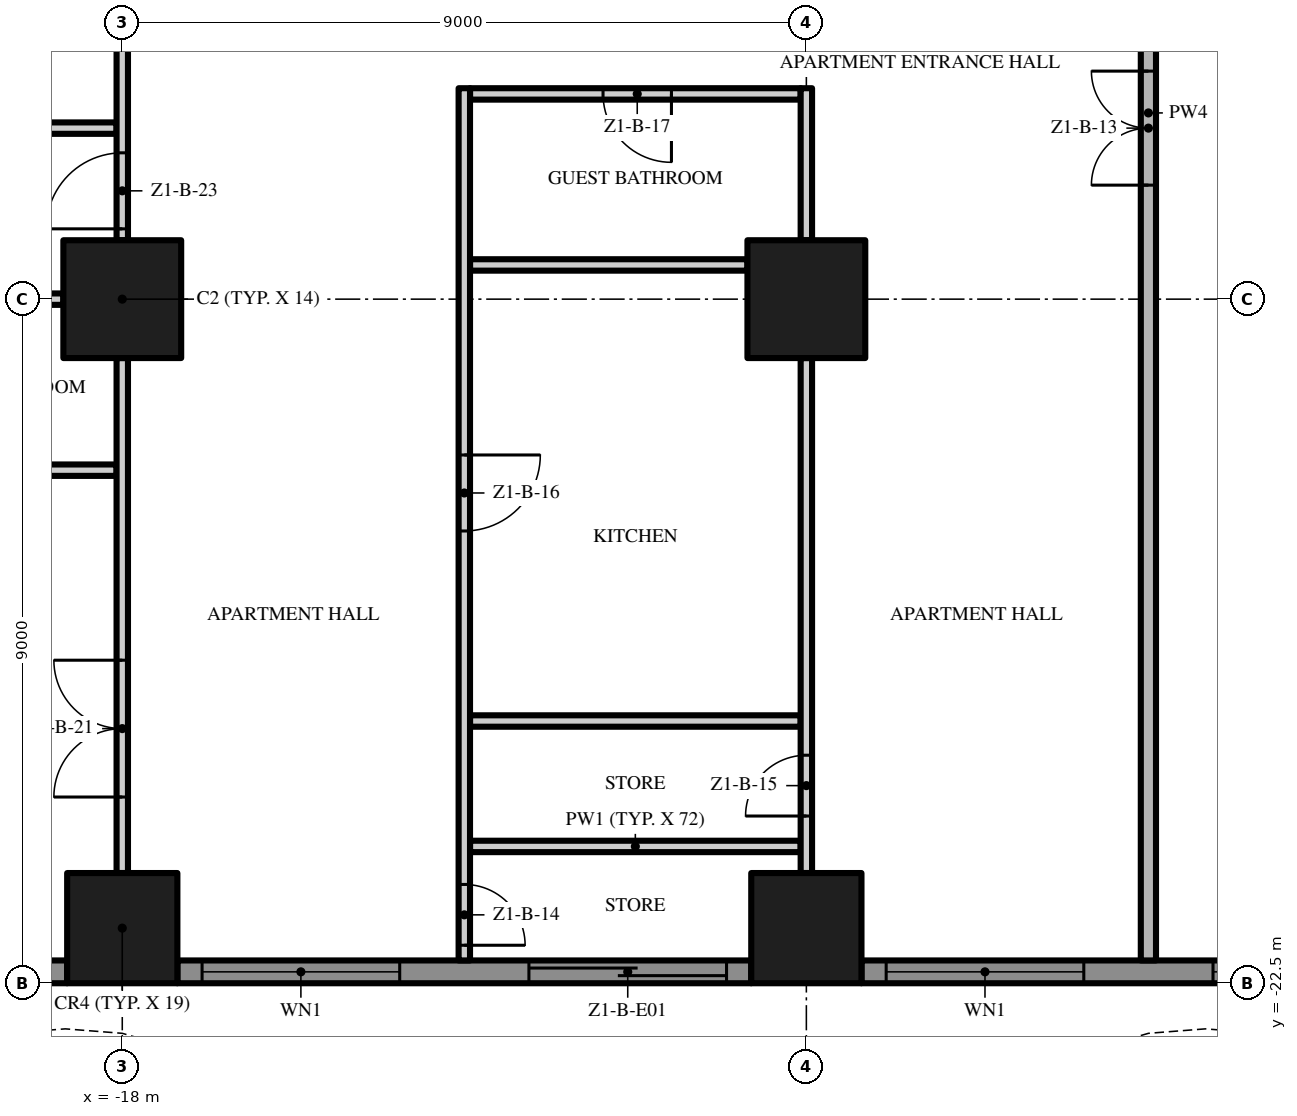
"""IFC4 building model, lengths in metres.
Left out: names, types, materials, properties, quantities, classifications, styles, units other than length and angle.
Written with IfcOpenShell. Run it as: python <this file> out.ifc"""

import sys

from ifc_helpers import new_model, si_unit, direction, frame, frame_2d, origin, origin_2d, place, context, subcontext, project, spatial, polyline, rectangle, outline, extrude, element, fill, save


model = new_model("IFC4")
c1 = context("Model", 3, precision=1e-05, world=origin(), true_north=direction((0.0, 1.0)))
c2 = subcontext(c1, "Body", "Model", "MODEL_VIEW")
j1 = project(units=[si_unit("LENGTHUNIT", "METRE"), si_unit("PLANEANGLEUNIT", "RADIAN")], contexts=[c1])
p1 = place(None, origin())
s1 = spatial("IfcSite", under=j1, at=p1, CompositionType="ELEMENT")
p2 = place(p1, origin())
s2 = spatial("IfcBuilding", under=s1, at=p2, CompositionType="ELEMENT")
p3 = place(p2, frame((0.0, 0.0, 30.2)))
s3 = spatial("IfcBuildingStorey", under=s2, at=p3, CompositionType="ELEMENT", Elevation=30.2)
p4 = place(p3, frame((-18.0, -13.5, 0.0), z_axis=(0.0, 0.0, 1.0), x_axis=(1.0, 0.0, 0.0)))
e1 = element("IfcColumn", 1, at=p4, inside=s3, PredefinedType="COLUMN", context=c2, shape_type="SweptSolid", body=[
    extrude(rectangle(XDim=1.55, YDim=1.55, at=origin_2d()), origin(), (0.0, 0.0, 1.0), 3.5),
])
p5 = place(p3, frame((-18.0, -21.775, 0.0), z_axis=(0.0, 0.0, 1.0), x_axis=(1.0, 0.0, 0.0)))
e2 = element("IfcColumn", 2, at=p5, inside=s3, PredefinedType="COLUMN", context=c2, shape_type="SweptSolid", body=[
    extrude(rectangle(XDim=1.45, YDim=1.45, at=origin_2d()), origin(), (0.0, 0.0, 1.0), 3.5),
])
p6 = place(p3, frame((-9.0, -13.5, 0.0), z_axis=(0.0, 0.0, 1.0), x_axis=(1.0, 0.0, 0.0)))
e3 = element("IfcColumn", 3, at=p6, inside=s3, PredefinedType="COLUMN", context=c2, shape_type="SweptSolid", body=[
    extrude(rectangle(XDim=1.55, YDim=1.55, at=origin_2d()), origin(), (0.0, 0.0, 1.0), 3.5),
])
p7 = place(p3, frame((-9.0, -21.775, 0.0), z_axis=(0.0, 0.0, 1.0), x_axis=(1.0, 0.0, 0.0)))
e4 = element("IfcColumn", 4, at=p7, inside=s3, PredefinedType="COLUMN", context=c2, shape_type="SweptSolid", body=[
    extrude(rectangle(XDim=1.45, YDim=1.45, at=origin_2d()), origin(), (0.0, 0.0, 1.0), 3.5),
])
p8 = place(p3, frame((-18.725, -22.35, 0.0), z_axis=(0.0, 0.0, 1.0), x_axis=(-1.0, 0.0, 0.0)))
e5 = element("IfcWall", 5, at=p8, inside=s3, PredefinedType="SOLIDWALL", context=c2, shape_type="SweptSolid", body=[
    extrude(rectangle(XDim=3.475, YDim=0.3, at=frame_2d((1.738, 0.0))), origin(), (0.0, 0.0, 1.0), 3.5),
])
p9 = place(p8, frame((0.325, 0.0, 0.45)))
e6 = element("IfcOpeningElement", 6, at=p9, cuts=e5, PredefinedType="OPENING", context=c2, shape_type="SweptSolid", body=[
    extrude(rectangle(XDim=2.6, YDim=2.65, at=frame_2d((1.3, 1.325))), frame((0.0, 0.16, 0.0), z_axis=(0.0, -1.0, 0.0), x_axis=(1.0, 0.0, 0.0)), (0.0, 0.0, 1.0), 0.32),
])
p10 = place(p3, frame((-9.725, -22.35, 0.0), z_axis=(0.0, 0.0, 1.0), x_axis=(-1.0, 0.0, 0.0)))
e7 = element("IfcWall", 7, at=p10, inside=s3, PredefinedType="SOLIDWALL", context=c2, shape_type="SweptSolid", body=[
    extrude(rectangle(XDim=7.55, YDim=0.3, at=frame_2d((3.775, 0.0))), origin(), (0.0, 0.0, 1.0), 3.5),
])
p11 = place(p10, frame((4.625, 0.0, 0.45)))
e8 = element("IfcOpeningElement", 8, at=p11, cuts=e7, PredefinedType="OPENING", context=c2, shape_type="SweptSolid", body=[
    extrude(rectangle(XDim=2.6, YDim=2.65, at=frame_2d((1.3, 1.325))), frame((0.0, 0.16, 0.0), z_axis=(0.0, -1.0, 0.0), x_axis=(1.0, 0.0, 0.0)), (0.0, 0.0, 1.0), 0.32),
])
p12 = place(p10, frame((0.325, 0.0, 0.0)))
e9 = element("IfcOpeningElement", 9, at=p12, cuts=e7, PredefinedType="OPENING", context=c2, shape_type="SweptSolid", body=[
    extrude(rectangle(XDim=2.6, YDim=2.4, at=frame_2d((1.3, 1.2))), frame((0.0, 0.16, 0.0), z_axis=(0.0, -1.0, 0.0), x_axis=(1.0, 0.0, 0.0)), (0.0, 0.0, 1.0), 0.32),
])
p13 = place(p3, frame((-0.725, -22.35, 0.0), z_axis=(0.0, 0.0, 1.0), x_axis=(-1.0, 0.0, 0.0)))
e10 = element("IfcWall", 10, at=p13, inside=s3, PredefinedType="SOLIDWALL", context=c2, shape_type="SweptSolid", body=[
    extrude(rectangle(XDim=7.55, YDim=0.3, at=frame_2d((3.775, 0.0))), origin(), (0.0, 0.0, 1.0), 3.5),
])
p14 = place(p13, frame((4.625, 0.0, 0.45)))
e11 = element("IfcOpeningElement", 11, at=p14, cuts=e10, PredefinedType="OPENING", context=c2, shape_type="SweptSolid", body=[
    extrude(rectangle(XDim=2.6, YDim=2.65, at=frame_2d((1.3, 1.325))), frame((0.0, 0.16, 0.0), z_axis=(0.0, -1.0, 0.0), x_axis=(1.0, 0.0, 0.0)), (0.0, 0.0, 1.0), 0.32),
])
p15 = place(p13, frame((0.325, 0.0, 0.45)))
e12 = element("IfcOpeningElement", 12, at=p15, cuts=e10, PredefinedType="OPENING", context=c2, shape_type="SweptSolid", body=[
    extrude(rectangle(XDim=2.6, YDim=2.65, at=frame_2d((1.3, 1.325))), frame((0.0, 0.16, 0.0), z_axis=(0.0, -1.0, 0.0), x_axis=(1.0, 0.0, 0.0)), (0.0, 0.0, 1.0), 0.32),
])
p16 = place(p3, origin())
e13 = element("IfcWall", 13, at=p16, inside=s3, PredefinedType="USERDEFINED", context=c2, shape_type="SweptSolid", body=[
    extrude(outline(polyline([(-22.5, -24.3), (-21.0, -23.595), (-19.5, -23.159), (-18.75, -23.1), (-18.0, -23.159), (-16.5, -23.595), (-15.0, -24.3), (-13.5, -25.005), (-12.0, -25.441), (-11.25, -25.5), (-10.5, -25.441), (-9.0, -25.005), (-7.5, -24.3), (-6.0, -23.595), (-4.5, -23.159), (-3.75, -23.1), (-3.0, -23.159), (-1.5, -23.595), (0.0, -24.3), (1.5, -25.005), (3.0, -25.441), (3.75, -25.5), (4.5, -25.441), (6.0, -25.005), (7.5, -24.3), (9.0, -23.595), (10.5, -23.159), (11.25, -23.1), (12.0, -23.159), (13.5, -23.595), (15.0, -24.3), (16.5, -25.005), (18.0, -25.441), (18.75, -25.5), (19.5, -25.441), (21.0, -25.005), (22.5, -24.3), (22.394, -24.074), (20.911, -24.771), (19.455, -25.194), (18.75, -25.249), (18.045, -25.194), (16.589, -24.771), (15.106, -24.074), (13.589, -23.36), (12.045, -22.911), (11.25, -22.849), (10.455, -22.911), (8.911, -23.36), (7.394, -24.074), (5.911, -24.771), (4.455, -25.194), (3.75, -25.249), (3.045, -25.194), (1.589, -24.771), (0.106, -24.074), (-1.411, -23.36), (-2.955, -22.911), (-3.75, -22.849), (-4.545, -22.911), (-6.089, -23.36), (-7.606, -24.074), (-9.089, -24.771), (-10.545, -25.194), (-11.25, -25.249), (-11.955, -25.194), (-13.411, -24.771), (-14.894, -24.074), (-16.411, -23.36), (-17.955, -22.911), (-18.75, -22.849), (-19.545, -22.911), (-21.089, -23.36), (-22.606, -24.074), (-22.5, -24.3)])), origin(), (0.0, 0.0, 1.0), 0.9),
])
for number, where, z_axis, x_axis in (
    (14, (-13.425, -20.7, 0.0), (0.0, 0.0, 1.0), (1.0, 0.0, 0.0)),
    (15, (-13.425, -19.05, 0.0), (0.0, 0.0, 1.0), (1.0, 0.0, 0.0)),
):
    element("IfcWall", number, at=place(p3, frame(where, z_axis=z_axis, x_axis=x_axis)), inside=s3, PredefinedType="PARTITIONING", context=c2, shape_type="SweptSolid", body=[
        extrude(rectangle(XDim=4.35, YDim=0.15, at=frame_2d((2.175, 0.0))), origin(), (0.0, 0.0, 1.0), 3.5),
    ])
p17 = place(p3, frame((-20.925, -15.75, 0.0), z_axis=(0.0, 0.0, 1.0), x_axis=(1.0, 0.0, 0.0)))
e16 = element("IfcWall", 16, at=p17, inside=s3, PredefinedType="PARTITIONING", context=c2, shape_type="SweptSolid", body=[
    extrude(rectangle(XDim=2.85, YDim=0.15, at=frame_2d((1.425, 0.0))), origin(), (0.0, 0.0, 1.0), 3.5),
])
p18 = place(p3, frame((-25.55, -13.5, 0.0), z_axis=(0.0, 0.0, 1.0), x_axis=(1.0, 0.0, 0.0)))
e17 = element("IfcWall", 17, at=p18, inside=s3, PredefinedType="PARTITIONING", context=c2, shape_type="SweptSolid", body=[
    extrude(rectangle(XDim=6.775, YDim=0.15, at=frame_2d((3.388, 0.0))), origin(), (0.0, 0.0, 1.0), 3.5),
])
p19 = place(p3, frame((-13.425, -13.05, 0.0), z_axis=(0.0, 0.0, 1.0), x_axis=(1.0, 0.0, 0.0)))
e18 = element("IfcWall", 18, at=p19, inside=s3, PredefinedType="PARTITIONING", context=c2, shape_type="SweptSolid", body=[
    extrude(rectangle(XDim=3.65, YDim=0.15, at=frame_2d((1.825, 0.0))), origin(), (0.0, 0.0, 1.0), 3.5),
])
p20 = place(p3, frame((-20.925, -11.25, 0.0), z_axis=(0.0, 0.0, 1.0), x_axis=(1.0, 0.0, 0.0)))
e19 = element("IfcWall", 19, at=p20, inside=s3, PredefinedType="PARTITIONING", context=c2, shape_type="SweptSolid", body=[
    extrude(rectangle(XDim=2.85, YDim=0.15, at=frame_2d((1.425, 0.0))), origin(), (0.0, 0.0, 1.0), 3.5),
])
p21 = place(p3, frame((-9.075, -10.8, 0.0), z_axis=(0.0, 0.0, 1.0), x_axis=(-1.0, 0.0, 0.0)))
e20 = element("IfcWall", 20, at=p21, inside=s3, PredefinedType="PARTITIONING", context=c2, shape_type="SweptSolid", body=[
    extrude(rectangle(XDim=4.35, YDim=0.15, at=frame_2d((2.175, 0.0))), origin(), (0.0, 0.0, 1.0), 3.5),
])
p22 = place(p21, frame((1.7, 0.0, 0.0)))
e21 = element("IfcOpeningElement", 21, at=p22, cuts=e20, PredefinedType="OPENING", context=c2, shape_type="SweptSolid", body=[
    extrude(rectangle(XDim=0.9, YDim=2.1, at=frame_2d((0.45, 1.05))), frame((0.0, 0.085, 0.0), z_axis=(0.0, -1.0, 0.0), x_axis=(1.0, 0.0, 0.0)), (0.0, 0.0, 1.0), 0.17),
])
p23 = place(p3, frame((-18.0, -21.05, 0.0), z_axis=(0.0, 0.0, 1.0), x_axis=(0.0, 1.0, 0.0)))
e22 = element("IfcWall", 22, at=p23, inside=s3, PredefinedType="PARTITIONING", context=c2, shape_type="SweptSolid", body=[
    extrude(rectangle(XDim=6.775, YDim=0.15, at=frame_2d((3.388, 0.0))), origin(), (0.0, 0.0, 1.0), 3.5),
])
p24 = place(p23, frame((1.0, 0.0, 0.0)))
e23 = element("IfcOpeningElement", 23, at=p24, cuts=e22, PredefinedType="OPENING", context=c2, shape_type="SweptSolid", body=[
    extrude(rectangle(XDim=1.8, YDim=2.4, at=frame_2d((0.9, 1.2))), frame((0.0, 0.085, 0.0), z_axis=(0.0, -1.0, 0.0), x_axis=(1.0, 0.0, 0.0)), (0.0, 0.0, 1.0), 0.17),
])
p25 = place(p3, frame((-18.0, -12.725, 0.0), z_axis=(0.0, 0.0, 1.0), x_axis=(0.0, 1.0, 0.0)))
e24 = element("IfcWall", 24, at=p25, inside=s3, PredefinedType="PARTITIONING", context=c2, shape_type="SweptSolid", body=[
    extrude(rectangle(XDim=7.45, YDim=0.15, at=frame_2d((3.725, 0.0))), origin(), (0.0, 0.0, 1.0), 3.5),
])
p26 = place(p25, frame((0.15, 0.0, 0.0)))
e25 = element("IfcOpeningElement", 25, at=p26, cuts=e24, PredefinedType="OPENING", context=c2, shape_type="SweptSolid", body=[
    extrude(rectangle(XDim=1.0, YDim=2.4, at=frame_2d((0.5, 1.2))), frame((0.0, 0.085, 0.0), z_axis=(0.0, -1.0, 0.0), x_axis=(1.0, 0.0, 0.0)), (0.0, 0.0, 1.0), 0.17),
])
p27 = place(p25, frame((6.3, 0.0, 0.0)))
e26 = element("IfcOpeningElement", 26, at=p27, cuts=e24, PredefinedType="OPENING", context=c2, shape_type="SweptSolid", body=[
    extrude(rectangle(XDim=1.0, YDim=2.4, at=frame_2d((0.5, 1.2))), frame((0.0, 0.085, 0.0), z_axis=(0.0, -1.0, 0.0), x_axis=(1.0, 0.0, 0.0)), (0.0, 0.0, 1.0), 0.17),
])
p28 = place(p3, frame((-13.5, -10.725, 0.0), z_axis=(0.0, 0.0, 1.0), x_axis=(0.0, -1.0, 0.0)))
e27 = element("IfcWall", 27, at=p28, inside=s3, PredefinedType="PARTITIONING", context=c2, shape_type="SweptSolid", body=[
    extrude(rectangle(XDim=11.475, YDim=0.15, at=frame_2d((5.737, 0.0))), origin(), (0.0, 0.0, 1.0), 3.5),
])
p29 = place(p28, frame((10.475, 0.0, 0.0)))
e28 = element("IfcOpeningElement", 28, at=p29, cuts=e27, PredefinedType="OPENING", context=c2, shape_type="SweptSolid", body=[
    extrude(rectangle(XDim=0.8, YDim=2.0, at=frame_2d((0.4, 1.0))), frame((0.0, 0.085, 0.0), z_axis=(0.0, -1.0, 0.0), x_axis=(1.0, 0.0, 0.0)), (0.0, 0.0, 1.0), 0.17),
])
p30 = place(p28, frame((4.825, 0.0, 0.0)))
e29 = element("IfcOpeningElement", 29, at=p30, cuts=e27, PredefinedType="OPENING", context=c2, shape_type="SweptSolid", body=[
    extrude(rectangle(XDim=1.0, YDim=2.4, at=frame_2d((0.5, 1.2))), frame((0.0, 0.085, 0.0), z_axis=(0.0, -1.0, 0.0), x_axis=(1.0, 0.0, 0.0)), (0.0, 0.0, 1.0), 0.17),
])
p31 = place(p3, frame((-9.0, -21.05, 0.0), z_axis=(0.0, 0.0, 1.0), x_axis=(0.0, 1.0, 0.0)))
e30 = element("IfcWall", 30, at=p31, inside=s3, PredefinedType="PARTITIONING", context=c2, shape_type="SweptSolid", body=[
    extrude(rectangle(XDim=6.775, YDim=0.15, at=frame_2d((3.388, 0.0))), origin(), (0.0, 0.0, 1.0), 3.5),
])
p32 = place(p31, frame((0.75, 0.0, 0.0)))
e31 = element("IfcOpeningElement", 31, at=p32, cuts=e30, PredefinedType="OPENING", context=c2, shape_type="SweptSolid", body=[
    extrude(rectangle(XDim=0.8, YDim=2.0, at=frame_2d((0.4, 1.0))), frame((0.0, 0.085, 0.0), z_axis=(0.0, -1.0, 0.0), x_axis=(1.0, 0.0, 0.0)), (0.0, 0.0, 1.0), 0.17),
])
p33 = place(p3, frame((-9.0, -12.725, 0.0), z_axis=(0.0, 0.0, 1.0), x_axis=(0.0, 1.0, 0.0)))
e32 = element("IfcWall", 32, at=p33, inside=s3, PredefinedType="PARTITIONING", context=c2, shape_type="SweptSolid", body=[
    extrude(rectangle(XDim=2.0, YDim=0.15, at=frame_2d((1.0, 0.0))), origin(), (0.0, 0.0, 1.0), 3.5),
])
p34 = place(p3, frame((-4.5, -22.2, 0.0), z_axis=(0.0, 0.0, 1.0), x_axis=(0.0, 1.0, 0.0)))
e33 = element("IfcWall", 33, at=p34, inside=s3, PredefinedType="PARTITIONING", context=c2, shape_type="SweptSolid", body=[
    extrude(rectangle(XDim=22.3, YDim=0.2, at=frame_2d((11.15, 0.0))), origin(), (0.0, 0.0, 1.0), 3.5),
])
p35 = place(p34, frame((10.2, 0.0, 0.0)))
e34 = element("IfcOpeningElement", 34, at=p35, cuts=e33, PredefinedType="OPENING", context=c2, shape_type="SweptSolid", body=[
    extrude(rectangle(XDim=1.5, YDim=2.4, at=frame_2d((0.75, 1.2))), frame((0.0, 0.11, 0.0), z_axis=(0.0, -1.0, 0.0), x_axis=(1.0, 0.0, 0.0)), (0.0, 0.0, 1.0), 0.22),
])
p36 = place(p11, origin())
e35 = element("IfcWindow", 35, at=p36, inside=s3, PartitioningType="SINGLE_PANEL", PredefinedType="WINDOW", context=c2, shape_type="SweptSolid", body=[
    extrude(rectangle(XDim=2.6, YDim=2.65, at=frame_2d((1.3, 1.325))), frame((0.0, 0.03, 0.0), z_axis=(0.0, -1.0, 0.0), x_axis=(1.0, 0.0, 0.0)), (0.0, 0.0, 1.0), 0.06),
])
fill(e8, e35)
p37 = place(p12, origin())
e36 = element("IfcDoor", 36, at=p37, inside=s3, OperationType="SINGLE_SWING_LEFT", PredefinedType="DOOR", context=c2, shape_type="SweptSolid", body=[
    extrude(rectangle(XDim=2.6, YDim=2.4, at=frame_2d((1.3, 1.2))), frame((0.0, 0.025, 0.0), z_axis=(0.0, -1.0, 0.0), x_axis=(1.0, 0.0, 0.0)), (0.0, 0.0, 1.0), 0.05),
])
fill(e9, e36)
p38 = place(p14, origin())
e37 = element("IfcWindow", 37, at=p38, inside=s3, PartitioningType="SINGLE_PANEL", PredefinedType="WINDOW", context=c2, shape_type="SweptSolid", body=[
    extrude(rectangle(XDim=2.6, YDim=2.65, at=frame_2d((1.3, 1.325))), frame((0.0, 0.03, 0.0), z_axis=(0.0, -1.0, 0.0), x_axis=(1.0, 0.0, 0.0)), (0.0, 0.0, 1.0), 0.06),
])
fill(e11, e37)
p39 = place(p15, origin())
e38 = element("IfcWindow", 38, at=p39, inside=s3, PartitioningType="SINGLE_PANEL", PredefinedType="WINDOW", context=c2, shape_type="SweptSolid", body=[
    extrude(rectangle(XDim=2.6, YDim=2.65, at=frame_2d((1.3, 1.325))), frame((0.0, 0.03, 0.0), z_axis=(0.0, -1.0, 0.0), x_axis=(1.0, 0.0, 0.0)), (0.0, 0.0, 1.0), 0.06),
])
fill(e12, e38)
p40 = place(p35, origin())
e39 = element("IfcDoor", 39, at=p40, inside=s3, OperationType="DOUBLE_DOOR_SINGLE_SWING", PredefinedType="DOOR", context=c2, shape_type="SweptSolid", body=[
    extrude(rectangle(XDim=1.5, YDim=2.4, at=frame_2d((0.75, 1.2))), frame((0.0, 0.025, 0.0), z_axis=(0.0, -1.0, 0.0), x_axis=(1.0, 0.0, 0.0)), (0.0, 0.0, 1.0), 0.05),
])
fill(e34, e39)
p41 = place(p29, origin())
e40 = element("IfcDoor", 40, at=p41, inside=s3, OperationType="SINGLE_SWING_RIGHT", PredefinedType="DOOR", context=c2, shape_type="SweptSolid", body=[
    extrude(rectangle(XDim=0.8, YDim=2.0, at=frame_2d((0.4, 1.0))), frame((0.0, 0.025, 0.0), z_axis=(0.0, -1.0, 0.0), x_axis=(1.0, 0.0, 0.0)), (0.0, 0.0, 1.0), 0.05),
])
fill(e28, e40)
p42 = place(p32, origin())
e41 = element("IfcDoor", 41, at=p42, inside=s3, OperationType="SINGLE_SWING_LEFT", PredefinedType="DOOR", context=c2, shape_type="SweptSolid", body=[
    extrude(rectangle(XDim=0.8, YDim=2.0, at=frame_2d((0.4, 1.0))), frame((0.0, 0.025, 0.0), z_axis=(0.0, -1.0, 0.0), x_axis=(1.0, 0.0, 0.0)), (0.0, 0.0, 1.0), 0.05),
])
fill(e31, e41)
p43 = place(p30, origin())
e42 = element("IfcDoor", 42, at=p43, inside=s3, OperationType="SINGLE_SWING_LEFT", PredefinedType="DOOR", context=c2, shape_type="SweptSolid", body=[
    extrude(rectangle(XDim=1.0, YDim=2.4, at=frame_2d((0.5, 1.2))), frame((0.0, 0.025, 0.0), z_axis=(0.0, -1.0, 0.0), x_axis=(1.0, 0.0, 0.0)), (0.0, 0.0, 1.0), 0.05),
])
fill(e29, e42)
p44 = place(p22, origin())
e43 = element("IfcDoor", 43, at=p44, inside=s3, OperationType="SINGLE_SWING_LEFT", PredefinedType="DOOR", context=c2, shape_type="SweptSolid", body=[
    extrude(rectangle(XDim=0.9, YDim=2.1, at=frame_2d((0.45, 1.05))), frame((0.0, 0.025, 0.0), z_axis=(0.0, -1.0, 0.0), x_axis=(1.0, 0.0, 0.0)), (0.0, 0.0, 1.0), 0.05),
])
fill(e21, e43)
p45 = place(p24, origin())
e44 = element("IfcDoor", 44, at=p45, inside=s3, OperationType="DOUBLE_DOOR_SINGLE_SWING", PredefinedType="DOOR", context=c2, shape_type="SweptSolid", body=[
    extrude(rectangle(XDim=1.8, YDim=2.4, at=frame_2d((0.9, 1.2))), frame((0.0, 0.025, 0.0), z_axis=(0.0, -1.0, 0.0), x_axis=(1.0, 0.0, 0.0)), (0.0, 0.0, 1.0), 0.05),
])
fill(e23, e44)
p46 = place(p26, origin())
e45 = element("IfcDoor", 45, at=p46, inside=s3, OperationType="SINGLE_SWING_LEFT", PredefinedType="DOOR", context=c2, shape_type="SweptSolid", body=[
    extrude(rectangle(XDim=1.0, YDim=2.4, at=frame_2d((0.5, 1.2))), frame((0.0, 0.025, 0.0), z_axis=(0.0, -1.0, 0.0), x_axis=(1.0, 0.0, 0.0)), (0.0, 0.0, 1.0), 0.05),
])
fill(e25, e45)
save(model, sys.argv[1])
